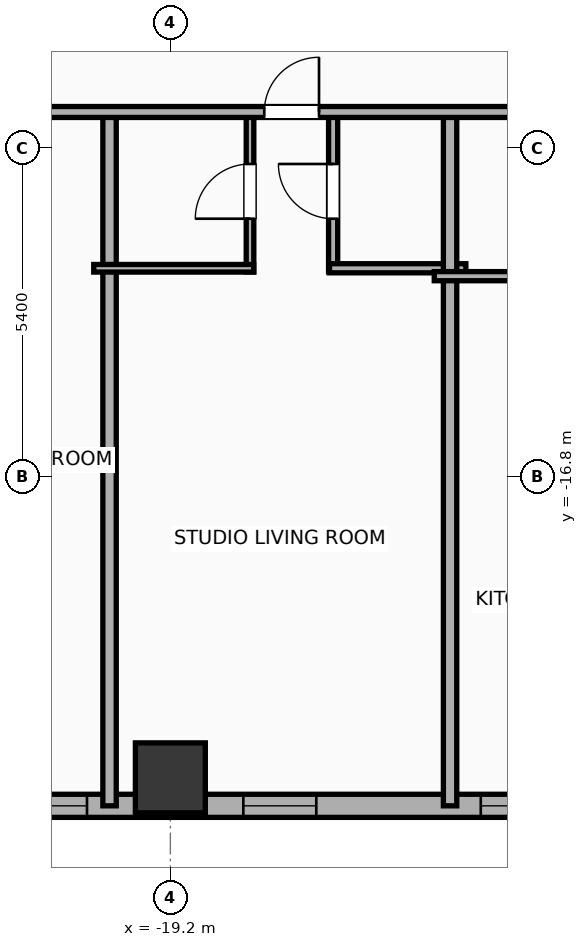
"""IFC4 building model, lengths in metres.
Left out: names, types, materials, properties, quantities, classifications, styles, units other than length and angle.
Written with IfcOpenShell. Run it as: python <this file> out.ifc"""

import sys

from ifc_helpers import new_model, si_unit, direction, frame, frame_2d, origin, origin_2d, place, context, subcontext, project, spatial, rectangle, hollow_rectangle, extrude, element, fill, save


model = new_model("IFC4")
c1 = context("Model", 3, precision=1e-05, world=origin(), true_north=direction((0.0, 1.0)))
c2 = subcontext(c1, "Body", "Model", "MODEL_VIEW")
j1 = project(units=[si_unit("LENGTHUNIT", "METRE"), si_unit("PLANEANGLEUNIT", "RADIAN")], contexts=[c1])
p1 = place(None, origin())
s1 = spatial("IfcSite", under=j1, at=p1, CompositionType="ELEMENT")
p2 = place(p1, origin())
s2 = spatial("IfcBuilding", under=s1, at=p2, CompositionType="ELEMENT")
p3 = place(p2, frame((0.0, 0.0, 29.9)))
s3 = spatial("IfcBuildingStorey", under=s2, at=p3, CompositionType="ELEMENT", Elevation=29.9)
p4 = place(p3, frame((-19.2, -21.75, 0.0), z_axis=(0.0, 0.0, 1.0), x_axis=(1.0, 0.0, 0.0)))
e1 = element("IfcColumn", 1, at=p4, inside=s3, PredefinedType="COLUMN", context=c2, shape_type="SweptSolid", body=[
    extrude(hollow_rectangle(XDim=1.15, YDim=1.15, WallThickness=0.04, at=origin_2d()), origin(), (0.0, 0.0, 1.0), 3.9),
])
p5 = place(p3, frame((22.381, -22.21, 0.0), z_axis=(0.0, 0.0, 1.0), x_axis=(-1.0, 0.0, 0.0)))
e2 = element("IfcWall", 2, at=p5, inside=s3, PredefinedType="ELEMENTEDWALL", context=c2, shape_type="SweptSolid", body=[
    extrude(rectangle(XDim=51.963, YDim=0.38, at=frame_2d((25.981, 0.0))), origin(), (0.0, 0.0, 1.0), 2.54),
])
p6 = place(p5, frame((5.81, 0.0, 0.75)))
e3 = element("IfcOpeningElement", 3, at=p6, cuts=e2, PredefinedType="OPENING", context=c2, shape_type="SweptSolid", body=[
    extrude(rectangle(XDim=2.4, YDim=1.63, at=frame_2d((1.2, 0.815))), frame((0.0, 0.2, 0.0), z_axis=(0.0, -1.0, 0.0), x_axis=(1.0, 0.0, 0.0)), (0.0, 0.0, 1.0), 0.4),
])
p7 = place(p5, frame((26.431, 0.0, 0.75)))
e4 = element("IfcOpeningElement", 4, at=p7, cuts=e2, PredefinedType="OPENING", context=c2, shape_type="SweptSolid", body=[
    extrude(rectangle(XDim=2.4, YDim=1.63, at=frame_2d((1.2, 0.815))), frame((0.0, 0.2, 0.0), z_axis=(0.0, -1.0, 0.0), x_axis=(1.0, 0.0, 0.0)), (0.0, 0.0, 1.0), 0.4),
])
p8 = place(p5, frame((42.952, 0.0, 0.75)))
e5 = element("IfcOpeningElement", 5, at=p8, cuts=e2, PredefinedType="OPENING", context=c2, shape_type="SweptSolid", body=[
    extrude(rectangle(XDim=2.4, YDim=1.63, at=frame_2d((1.2, 0.815))), frame((0.0, 0.2, 0.0), z_axis=(0.0, -1.0, 0.0), x_axis=(1.0, 0.0, 0.0)), (0.0, 0.0, 1.0), 0.4),
])
p9 = place(p5, frame((49.027, 0.0, 0.75)))
e6 = element("IfcOpeningElement", 6, at=p9, cuts=e2, PredefinedType="OPENING", context=c2, shape_type="SweptSolid", body=[
    extrude(rectangle(XDim=1.2, YDim=1.63, at=frame_2d((0.6, 0.815))), frame((0.0, 0.2, 0.0), z_axis=(0.0, -1.0, 0.0), x_axis=(1.0, 0.0, 0.0)), (0.0, 0.0, 1.0), 0.4),
])
p10 = place(p5, frame((46.476, 0.0, 0.75)))
e7 = element("IfcOpeningElement", 7, at=p10, cuts=e2, PredefinedType="OPENING", context=c2, shape_type="SweptSolid", body=[
    extrude(rectangle(XDim=1.2, YDim=1.63, at=frame_2d((0.6, 0.815))), frame((0.0, 0.2, 0.0), z_axis=(0.0, -1.0, 0.0), x_axis=(1.0, 0.0, 0.0)), (0.0, 0.0, 1.0), 0.4),
])
p11 = place(p5, frame((39.181, 0.0, 0.75)))
e8 = element("IfcOpeningElement", 8, at=p11, cuts=e2, PredefinedType="OPENING", context=c2, shape_type="SweptSolid", body=[
    extrude(rectangle(XDim=1.2, YDim=1.63, at=frame_2d((0.6, 0.815))), frame((0.0, 0.2, 0.0), z_axis=(0.0, -1.0, 0.0), x_axis=(1.0, 0.0, 0.0)), (0.0, 0.0, 1.0), 0.4),
])
p12 = place(p5, frame((32.476, 0.0, 0.75)))
e9 = element("IfcOpeningElement", 9, at=p12, cuts=e2, PredefinedType="OPENING", context=c2, shape_type="SweptSolid", body=[
    extrude(rectangle(XDim=1.2, YDim=1.63, at=frame_2d((0.6, 0.815))), frame((0.0, 0.2, 0.0), z_axis=(0.0, -1.0, 0.0), x_axis=(1.0, 0.0, 0.0)), (0.0, 0.0, 1.0), 0.4),
])
p13 = place(p5, frame((35.276, 0.0, 0.75)))
e10 = element("IfcOpeningElement", 10, at=p13, cuts=e2, PredefinedType="OPENING", context=c2, shape_type="SweptSolid", body=[
    extrude(rectangle(XDim=1.2, YDim=1.63, at=frame_2d((0.6, 0.815))), frame((0.0, 0.2, 0.0), z_axis=(0.0, -1.0, 0.0), x_axis=(1.0, 0.0, 0.0)), (0.0, 0.0, 1.0), 0.4),
])
p14 = place(p5, frame((29.491, 0.0, 0.75)))
e11 = element("IfcOpeningElement", 11, at=p14, cuts=e2, PredefinedType="OPENING", context=c2, shape_type="SweptSolid", body=[
    extrude(rectangle(XDim=0.85, YDim=1.63, at=frame_2d((0.425, 0.815))), frame((0.0, 0.2, 0.0), z_axis=(0.0, -1.0, 0.0), x_axis=(1.0, 0.0, 0.0)), (0.0, 0.0, 1.0), 0.4),
])
p15 = place(p5, frame((21.596, 0.0, 0.75)))
e12 = element("IfcOpeningElement", 12, at=p15, cuts=e2, PredefinedType="OPENING", context=c2, shape_type="SweptSolid", body=[
    extrude(rectangle(XDim=1.2, YDim=1.63, at=frame_2d((0.6, 0.815))), frame((0.0, 0.2, 0.0), z_axis=(0.0, -1.0, 0.0), x_axis=(1.0, 0.0, 0.0)), (0.0, 0.0, 1.0), 0.4),
])
p16 = place(p5, frame((24.036, 0.0, 0.75)))
e13 = element("IfcOpeningElement", 13, at=p16, cuts=e2, PredefinedType="OPENING", context=c2, shape_type="SweptSolid", body=[
    extrude(rectangle(XDim=1.2, YDim=1.63, at=frame_2d((0.6, 0.815))), frame((0.0, 0.2, 0.0), z_axis=(0.0, -1.0, 0.0), x_axis=(1.0, 0.0, 0.0)), (0.0, 0.0, 1.0), 0.4),
])
p17 = place(p5, frame((17.886, 0.0, 0.75)))
e14 = element("IfcOpeningElement", 14, at=p17, cuts=e2, PredefinedType="OPENING", context=c2, shape_type="SweptSolid", body=[
    extrude(rectangle(XDim=1.2, YDim=1.63, at=frame_2d((0.6, 0.815))), frame((0.0, 0.2, 0.0), z_axis=(0.0, -1.0, 0.0), x_axis=(1.0, 0.0, 0.0)), (0.0, 0.0, 1.0), 0.4),
])
p18 = place(p5, frame((15.086, 0.0, 0.75)))
e15 = element("IfcOpeningElement", 15, at=p18, cuts=e2, PredefinedType="OPENING", context=c2, shape_type="SweptSolid", body=[
    extrude(rectangle(XDim=1.2, YDim=1.63, at=frame_2d((0.6, 0.815))), frame((0.0, 0.2, 0.0), z_axis=(0.0, -1.0, 0.0), x_axis=(1.0, 0.0, 0.0)), (0.0, 0.0, 1.0), 0.4),
])
p19 = place(p5, frame((11.181, 0.0, 0.75)))
e16 = element("IfcOpeningElement", 16, at=p19, cuts=e2, PredefinedType="OPENING", context=c2, shape_type="SweptSolid", body=[
    extrude(rectangle(XDim=1.2, YDim=1.63, at=frame_2d((0.6, 0.815))), frame((0.0, 0.2, 0.0), z_axis=(0.0, -1.0, 0.0), x_axis=(1.0, 0.0, 0.0)), (0.0, 0.0, 1.0), 0.4),
])
p20 = place(p5, frame((3.886, 0.0, 0.75)))
e17 = element("IfcOpeningElement", 17, at=p20, cuts=e2, PredefinedType="OPENING", context=c2, shape_type="SweptSolid", body=[
    extrude(rectangle(XDim=1.2, YDim=1.63, at=frame_2d((0.6, 0.815))), frame((0.0, 0.2, 0.0), z_axis=(0.0, -1.0, 0.0), x_axis=(1.0, 0.0, 0.0)), (0.0, 0.0, 1.0), 0.4),
])
p21 = place(p5, frame((1.536, 0.0, 0.75)))
e18 = element("IfcOpeningElement", 18, at=p21, cuts=e2, PredefinedType="OPENING", context=c2, shape_type="SweptSolid", body=[
    extrude(rectangle(XDim=1.2, YDim=1.63, at=frame_2d((0.6, 0.815))), frame((0.0, 0.2, 0.0), z_axis=(0.0, -1.0, 0.0), x_axis=(1.0, 0.0, 0.0)), (0.0, 0.0, 1.0), 0.4),
])
p22 = place(p3, frame((-20.2, -22.21, 0.0), z_axis=(0.0, 0.0, 1.0), x_axis=(0.0, 1.0, 0.0)))
e19 = element("IfcWall", 19, at=p22, inside=s3, PredefinedType="PARTITIONING", context=c2, shape_type="SweptSolid", body=[
    extrude(rectangle(XDim=11.49, YDim=0.22, at=frame_2d((5.745, 0.0))), origin(), (0.0, 0.0, 1.0), 3.65),
])
p23 = place(p3, frame((-17.89, -13.43, 0.0), z_axis=(0.0, 0.0, 1.0), x_axis=(0.0, 1.0, 0.0)))
e20 = element("IfcWall", 20, at=p23, inside=s3, PredefinedType="PARTITIONING", context=c2, shape_type="SweptSolid", body=[
    extrude(rectangle(XDim=2.65, YDim=0.125, at=frame_2d((1.325, 0.0))), origin(), (0.0, 0.0, 1.0), 3.65),
])
p24 = place(p23, frame((0.875, 0.0, 0.0)))
e21 = element("IfcOpeningElement", 21, at=p24, cuts=e20, PredefinedType="OPENING", context=c2, shape_type="SweptSolid", body=[
    extrude(rectangle(XDim=0.9, YDim=2.05, at=frame_2d((0.45, 1.025))), frame((0.0, 0.073, 0.0), z_axis=(0.0, -1.0, 0.0), x_axis=(1.0, 0.0, 0.0)), (0.0, 0.0, 1.0), 0.145),
])
p25 = place(p3, frame((-16.523, -13.43, 0.0), z_axis=(0.0, 0.0, 1.0), x_axis=(0.0, 1.0, 0.0)))
e22 = element("IfcWall", 22, at=p25, inside=s3, PredefinedType="PLUMBINGWALL", context=c2, shape_type="SweptSolid", body=[
    extrude(rectangle(XDim=2.65, YDim=0.15, at=frame_2d((1.325, 0.0))), origin(), (0.0, 0.0, 1.0), 3.65),
])
p26 = place(p25, frame((0.875, 0.0, 0.0)))
e23 = element("IfcOpeningElement", 23, at=p26, cuts=e22, PredefinedType="OPENING", context=c2, shape_type="SweptSolid", body=[
    extrude(rectangle(XDim=0.9, YDim=2.05, at=frame_2d((0.45, 1.025))), frame((0.0, 0.085, 0.0), z_axis=(0.0, -1.0, 0.0), x_axis=(1.0, 0.0, 0.0)), (0.0, 0.0, 1.0), 0.17),
])
p27 = place(p3, frame((-20.46, -13.37, 0.0), z_axis=(0.0, 0.0, 1.0), x_axis=(1.0, 0.0, 0.0)))
e24 = element("IfcWall", 24, at=p27, inside=s3, PredefinedType="PARTITIONING", context=c2, shape_type="SweptSolid", body=[
    extrude(rectangle(XDim=2.63, YDim=0.125, at=frame_2d((1.315, 0.0))), origin(), (0.0, 0.0, 1.0), 3.65),
])
p28 = place(p3, frame((-16.583, -13.37, 0.0), z_axis=(0.0, 0.0, 1.0), x_axis=(1.0, 0.0, 0.0)))
e25 = element("IfcWall", 25, at=p28, inside=s3, PredefinedType="PLUMBINGWALL", context=c2, shape_type="SweptSolid", body=[
    extrude(rectangle(XDim=2.243, YDim=0.15, at=frame_2d((1.122, 0.0))), origin(), (0.0, 0.0, 1.0), 3.65),
])
p29 = place(p3, frame((-14.6, -22.21, 0.0), z_axis=(0.0, 0.0, 1.0), x_axis=(0.0, 1.0, 0.0)))
e26 = element("IfcWall", 26, at=p29, inside=s3, PredefinedType="PARTITIONING", context=c2, shape_type="SweptSolid", body=[
    extrude(rectangle(XDim=11.49, YDim=0.22, at=frame_2d((5.745, 0.0))), origin(), (0.0, 0.0, 1.0), 3.65),
])
p30 = place(p3, frame((-14.86, -13.5, 0.0), z_axis=(0.0, 0.0, 1.0), x_axis=(1.0, 0.0, 0.0)))
e27 = element("IfcWall", 27, at=p30, inside=s3, PredefinedType="PLUMBINGWALL", context=c2, shape_type="SweptSolid", body=[
    extrude(rectangle(XDim=2.55, YDim=0.15, at=frame_2d((1.275, 0.0))), origin(), (0.0, 0.0, 1.0), 3.65),
])
p31 = place(p3, frame((-33.41, -10.8, 0.0), z_axis=(0.0, 0.0, 1.0), x_axis=(1.0, 0.0, 0.0)))
e28 = element("IfcWall", 28, at=p31, inside=s3, PredefinedType="PARTITIONING", context=c2, shape_type="SweptSolid", body=[
    extrude(rectangle(XDim=59.62, YDim=0.18, at=frame_2d((29.81, 0.0))), origin(), (0.0, 0.0, 1.0), 3.65),
])
p32 = place(p31, frame((3.36, 0.0, 0.0)))
e29 = element("IfcOpeningElement", 29, at=p32, cuts=e28, PredefinedType="OPENING", context=c2, shape_type="SweptSolid", body=[
    extrude(rectangle(XDim=1.15, YDim=2.05, at=frame_2d((0.575, 1.025))), frame((0.0, 0.1, 0.0), z_axis=(0.0, -1.0, 0.0), x_axis=(1.0, 0.0, 0.0)), (0.0, 0.0, 1.0), 0.2),
])
p33 = place(p31, frame((10.908, 0.0, 0.0)))
e30 = element("IfcOpeningElement", 30, at=p33, cuts=e28, PredefinedType="OPENING", context=c2, shape_type="SweptSolid", body=[
    extrude(rectangle(XDim=1.15, YDim=2.05, at=frame_2d((0.575, 1.025))), frame((0.0, 0.1, 0.0), z_axis=(0.0, -1.0, 0.0), x_axis=(1.0, 0.0, 0.0)), (0.0, 0.0, 1.0), 0.2),
])
p34 = place(p31, frame((15.755, 0.0, 0.0)))
e31 = element("IfcOpeningElement", 31, at=p34, cuts=e28, PredefinedType="OPENING", context=c2, shape_type="SweptSolid", body=[
    extrude(rectangle(XDim=0.9, YDim=2.05, at=frame_2d((0.45, 1.025))), frame((0.0, 0.1, 0.0), z_axis=(0.0, -1.0, 0.0), x_axis=(1.0, 0.0, 0.0)), (0.0, 0.0, 1.0), 0.2),
])
p35 = place(p31, frame((22.11, 0.0, 0.0)))
e32 = element("IfcOpeningElement", 32, at=p35, cuts=e28, PredefinedType="OPENING", context=c2, shape_type="SweptSolid", body=[
    extrude(rectangle(XDim=1.15, YDim=2.05, at=frame_2d((0.575, 1.025))), frame((0.0, 0.1, 0.0), z_axis=(0.0, -1.0, 0.0), x_axis=(1.0, 0.0, 0.0)), (0.0, 0.0, 1.0), 0.2),
])
p36 = place(p31, frame((27.709, 0.0, 0.0)))
e33 = element("IfcOpeningElement", 33, at=p36, cuts=e28, PredefinedType="OPENING", context=c2, shape_type="SweptSolid", body=[
    extrude(rectangle(XDim=1.15, YDim=2.05, at=frame_2d((0.575, 1.025))), frame((0.0, 0.1, 0.0), z_axis=(0.0, -1.0, 0.0), x_axis=(1.0, 0.0, 0.0)), (0.0, 0.0, 1.0), 0.2),
])
p37 = place(p31, frame((33.349, 0.0, 0.0)))
e34 = element("IfcOpeningElement", 34, at=p37, cuts=e28, PredefinedType="OPENING", context=c2, shape_type="SweptSolid", body=[
    extrude(rectangle(XDim=1.15, YDim=2.05, at=frame_2d((0.575, 1.025))), frame((0.0, 0.1, 0.0), z_axis=(0.0, -1.0, 0.0), x_axis=(1.0, 0.0, 0.0)), (0.0, 0.0, 1.0), 0.2),
])
p38 = place(p31, frame((36.759, 0.0, 0.0)))
e35 = element("IfcOpeningElement", 35, at=p38, cuts=e28, PredefinedType="OPENING", context=c2, shape_type="SweptSolid", body=[
    extrude(rectangle(XDim=1.15, YDim=2.05, at=frame_2d((0.575, 1.025))), frame((0.0, 0.1, 0.0), z_axis=(0.0, -1.0, 0.0), x_axis=(1.0, 0.0, 0.0)), (0.0, 0.0, 1.0), 0.2),
])
p39 = place(p31, frame((43.752, 0.0, 0.0)))
e36 = element("IfcOpeningElement", 36, at=p39, cuts=e28, PredefinedType="OPENING", context=c2, shape_type="SweptSolid", body=[
    extrude(rectangle(XDim=0.9, YDim=2.05, at=frame_2d((0.45, 1.025))), frame((0.0, 0.1, 0.0), z_axis=(0.0, -1.0, 0.0), x_axis=(1.0, 0.0, 0.0)), (0.0, 0.0, 1.0), 0.2),
])
p40 = place(p31, frame((47.962, 0.0, 0.0)))
e37 = element("IfcOpeningElement", 37, at=p40, cuts=e28, PredefinedType="OPENING", context=c2, shape_type="SweptSolid", body=[
    extrude(rectangle(XDim=1.15, YDim=2.05, at=frame_2d((0.575, 1.025))), frame((0.0, 0.1, 0.0), z_axis=(0.0, -1.0, 0.0), x_axis=(1.0, 0.0, 0.0)), (0.0, 0.0, 1.0), 0.2),
])
p41 = place(p31, frame((55.641, 0.0, 0.0)))
e38 = element("IfcOpeningElement", 38, at=p41, cuts=e28, PredefinedType="OPENING", context=c2, shape_type="SweptSolid", body=[
    extrude(rectangle(XDim=1.15, YDim=2.05, at=frame_2d((0.575, 1.025))), frame((0.0, 0.1, 0.0), z_axis=(0.0, -1.0, 0.0), x_axis=(1.0, 0.0, 0.0)), (0.0, 0.0, 1.0), 0.2),
])
p42 = place(p8, origin())
e39 = element("IfcWindow", 39, at=p42, inside=s3, PartitioningType="SINGLE_PANEL", PredefinedType="WINDOW", context=c2, shape_type="SweptSolid", body=[
    extrude(rectangle(XDim=2.4, YDim=1.63, at=frame_2d((1.2, 0.815))), frame((0.0, 0.03, 0.0), z_axis=(0.0, -1.0, 0.0), x_axis=(1.0, 0.0, 0.0)), (0.0, 0.0, 1.0), 0.06),
])
fill(e5, e39)
p43 = place(p11, origin())
e40 = element("IfcWindow", 40, at=p43, inside=s3, PartitioningType="SINGLE_PANEL", PredefinedType="WINDOW", context=c2, shape_type="SweptSolid", body=[
    extrude(rectangle(XDim=1.2, YDim=1.63, at=frame_2d((0.6, 0.815))), frame((0.0, 0.03, 0.0), z_axis=(0.0, -1.0, 0.0), x_axis=(1.0, 0.0, 0.0)), (0.0, 0.0, 1.0), 0.06),
])
fill(e8, e40)
p44 = place(p13, origin())
e41 = element("IfcWindow", 41, at=p44, inside=s3, PartitioningType="SINGLE_PANEL", PredefinedType="WINDOW", context=c2, shape_type="SweptSolid", body=[
    extrude(rectangle(XDim=1.2, YDim=1.63, at=frame_2d((0.6, 0.815))), frame((0.0, 0.03, 0.0), z_axis=(0.0, -1.0, 0.0), x_axis=(1.0, 0.0, 0.0)), (0.0, 0.0, 1.0), 0.06),
])
fill(e10, e41)
p45 = place(p24, origin())
e42 = element("IfcDoor", 42, at=p45, inside=s3, OperationType="SINGLE_SWING_LEFT", PredefinedType="DOOR", context=c2, shape_type="SweptSolid", body=[
    extrude(rectangle(XDim=0.9, YDim=2.05, at=frame_2d((0.45, 1.025))), frame((0.0, 0.025, 0.0), z_axis=(0.0, -1.0, 0.0), x_axis=(1.0, 0.0, 0.0)), (0.0, 0.0, 1.0), 0.05),
])
fill(e21, e42)
p46 = place(p26, origin())
e43 = element("IfcDoor", 43, at=p46, inside=s3, OperationType="SINGLE_SWING_RIGHT", PredefinedType="DOOR", context=c2, shape_type="SweptSolid", body=[
    extrude(rectangle(XDim=0.9, YDim=2.05, at=frame_2d((0.45, 1.025))), frame((0.0, 0.025, 0.0), z_axis=(0.0, -1.0, 0.0), x_axis=(1.0, 0.0, 0.0)), (0.0, 0.0, 1.0), 0.05),
])
fill(e23, e43)
p47 = place(p34, origin())
e44 = element("IfcDoor", 44, at=p47, inside=s3, OperationType="SINGLE_SWING_RIGHT", PredefinedType="DOOR", context=c2, shape_type="SweptSolid", body=[
    extrude(rectangle(XDim=0.9, YDim=2.05, at=frame_2d((0.45, 1.025))), frame((0.0, 0.025, 0.0), z_axis=(0.0, -1.0, 0.0), x_axis=(1.0, 0.0, 0.0)), (0.0, 0.0, 1.0), 0.05),
])
fill(e31, e44)
save(model, sys.argv[1])
